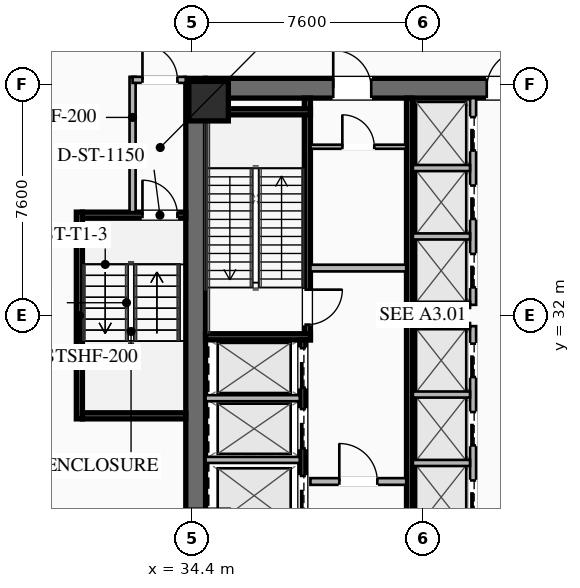
"""IFC4 building model, lengths in metres.
Left out: names, types, materials, properties, quantities, classifications, styles, units other than length and angle.
Written with IfcOpenShell. Run it as: python <this file> out.ifc"""

import sys

from ifc_helpers import new_model, si_unit, direction, frame, frame_2d, origin, origin_2d, place, context, subcontext, project, spatial, rectangle, hollow_rectangle, extrude, element, fill, save


model = new_model("IFC4")
c1 = context("Model", 3, precision=1e-05, world=origin(), true_north=direction((0.0, 1.0)))
c2 = subcontext(c1, "Body", "Model", "MODEL_VIEW")
j1 = project(units=[si_unit("LENGTHUNIT", "METRE"), si_unit("PLANEANGLEUNIT", "RADIAN")], contexts=[c1])
p1 = place(None, origin())
s1 = spatial("IfcSite", under=j1, at=p1, CompositionType="ELEMENT")
p2 = place(p1, origin())
s2 = spatial("IfcBuilding", under=s1, at=p2, CompositionType="ELEMENT")
p3 = place(p2, origin())
s3 = spatial("IfcBuildingStorey", under=s2, at=p3, CompositionType="ELEMENT", Elevation=0.0)
p4 = place(p3, frame((34.525, 24.2, 0.0), z_axis=(0.0, 0.0, 1.0), x_axis=(0.0, 1.0, 0.0)))
e1 = element("IfcWall", 1, at=p4, inside=s3, PredefinedType="SHEAR", context=c2, shape_type="SweptSolid", body=[
    extrude(rectangle(XDim=15.6, YDim=0.65, at=frame_2d((7.8, 0.0))), origin(), (0.0, 0.0, 1.0), 5.4),
])
p5 = place(p3, frame((34.85, 39.475, 0.0), z_axis=(0.0, 0.0, 1.0), x_axis=(1.0, 0.0, 0.0)))
e2 = element("IfcWall", 2, at=p5, inside=s3, PredefinedType="SHEAR", context=c2, shape_type="SweptSolid", body=[
    extrude(rectangle(XDim=14.3, YDim=0.65, at=frame_2d((7.15, 0.0))), origin(), (0.0, 0.0, 1.0), 5.4),
])
p6 = place(p5, frame((4.2, 0.0, 0.0)))
e3 = element("IfcOpeningElement", 3, at=p6, cuts=e2, PredefinedType="OPENING", context=c2, shape_type="SweptSolid", body=[
    extrude(rectangle(XDim=1.25, YDim=2.25, at=frame_2d((0.625, 1.125))), frame((0.0, 0.335, 0.0), z_axis=(0.0, -1.0, 0.0), x_axis=(1.0, 0.0, 0.0)), (0.0, 0.0, 1.0), 0.67),
])
p7 = place(p5, frame((9.25, 0.0, 0.0)))
e4 = element("IfcOpeningElement", 4, at=p7, cuts=e2, PredefinedType="OPENING", context=c2, shape_type="SweptSolid", body=[
    extrude(rectangle(XDim=1.25, YDim=2.25, at=frame_2d((0.625, 1.125))), frame((0.0, 0.335, 0.0), z_axis=(0.0, -1.0, 0.0), x_axis=(1.0, 0.0, 0.0)), (0.0, 0.0, 1.0), 0.67),
])
p8 = place(p3, frame((34.95, 39.05, 0.0), z_axis=(0.0, 0.0, 1.0), x_axis=(1.0, 0.0, 0.0)))
e5 = element("IfcColumn", 5, at=p8, inside=s3, PredefinedType="COLUMN", context=c2, shape_type="SweptSolid", body=[
    extrude(hollow_rectangle(XDim=1.3, YDim=1.3, WallThickness=0.05, at=origin_2d()), origin(), (0.0, 0.0, 1.0), 5.14),
])
p9 = place(p3, frame((38.2, 39.15, 0.0), z_axis=(0.0, 0.0, 1.0), x_axis=(0.0, -1.0, 0.0)))
e6 = element("IfcWall", 6, at=p9, inside=s3, PredefinedType="SHEAR", context=c2, shape_type="SweptSolid", body=[
    extrude(rectangle(XDim=7.95, YDim=0.2, at=frame_2d((3.975, 0.0))), origin(), (0.0, 0.0, 1.0), 5.14),
])
p10 = place(p9, frame((6.3, 0.0, 0.0)))
e7 = element("IfcOpeningElement", 7, at=p10, cuts=e6, PredefinedType="OPENING", context=c2, shape_type="SweptSolid", body=[
    extrude(rectangle(XDim=1.15, YDim=2.2, at=frame_2d((0.575, 1.1))), frame((0.0, 0.11, 0.0), z_axis=(0.0, -1.0, 0.0), x_axis=(1.0, 0.0, 0.0)), (0.0, 0.0, 1.0), 0.22),
])
for number, where, z_axis, x_axis in (
    (8, (34.85, 31.3, 0.0), (0.0, 0.0, 1.0), (1.0, 0.0, 0.0)),
    (9, (34.85, 38.7, 0.0), (0.0, 0.0, 1.0), (1.0, 0.0, 0.0)),
):
    element("IfcWall", number, at=place(p3, frame(where, z_axis=z_axis, x_axis=x_axis)), inside=s3, PredefinedType="SHEAR", context=c2, shape_type="SweptSolid", body=[
        extrude(rectangle(XDim=3.45, YDim=0.2, at=frame_2d((1.725, 0.0))), origin(), (0.0, 0.0, 1.0), 5.14),
    ])
p11 = place(p3, frame((41.56, 24.85, 0.0), z_axis=(0.0, 0.0, 1.0), x_axis=(0.0, 1.0, 0.0)))
e10 = element("IfcWall", 10, at=p11, inside=s3, PredefinedType="SHEAR", context=c2, shape_type="SweptSolid", body=[
    extrude(rectangle(XDim=14.3, YDim=0.2, at=frame_2d((7.15, 0.0))), origin(), (0.0, 0.0, 1.0), 5.14),
])
p12 = place(p3, frame((38.3, 33.56, 0.0), z_axis=(0.0, 0.0, 1.0), x_axis=(1.0, 0.0, 0.0)))
e11 = element("IfcWall", 11, at=p12, inside=s3, PredefinedType="SOLIDWALL", context=c2, shape_type="SweptSolid", body=[
    extrude(rectangle(XDim=3.15, YDim=0.22, at=frame_2d((1.575, 0.0))), origin(), (0.0, 0.0, 1.0), 3.31),
])
p13 = place(p3, frame((38.3, 26.54, 0.0), z_axis=(0.0, 0.0, 1.0), x_axis=(1.0, 0.0, 0.0)))
e12 = element("IfcWall", 12, at=p13, inside=s3, PredefinedType="SOLIDWALL", context=c2, shape_type="SweptSolid", body=[
    extrude(rectangle(XDim=3.15, YDim=0.22, at=frame_2d((1.575, 0.0))), origin(), (0.0, 0.0, 1.0), 3.31),
])
p14 = place(p13, frame((0.95, 0.0, 0.0)))
e13 = element("IfcOpeningElement", 13, at=p14, cuts=e12, PredefinedType="OPENING", context=c2, shape_type="SweptSolid", body=[
    extrude(rectangle(XDim=1.25, YDim=2.25, at=frame_2d((0.625, 1.125))), frame((0.0, 0.12, 0.0), z_axis=(0.0, -1.0, 0.0), x_axis=(1.0, 0.0, 0.0)), (0.0, 0.0, 1.0), 0.24),
])
p15 = place(p3, frame((38.05, 24.85, 0.0), z_axis=(0.0, 0.0, 1.0), x_axis=(0.0, 1.0, 0.0)))
e14 = element("IfcWall", 14, at=p15, inside=s3, PredefinedType="SHEAR", context=c2, shape_type="SweptSolid", body=[
    extrude(rectangle(XDim=6.35, YDim=0.2, at=frame_2d((3.175, 0.0))), origin(), (0.0, 0.0, 1.0), 5.14),
])
p16 = place(p15, frame((4.775, 0.0, 0.0)))
e15 = element("IfcOpeningElement", 15, at=p16, cuts=e14, PredefinedType="OPENING", context=c2, shape_type="SweptSolid", body=[
    extrude(rectangle(XDim=1.3, YDim=2.25, at=frame_2d((0.65, 1.125))), frame((0.0, 0.11, 0.0), z_axis=(0.0, -1.0, 0.0), x_axis=(1.0, 0.0, 0.0)), (0.0, 0.0, 1.0), 0.22),
])
p17 = place(p15, frame((2.775, 0.0, 0.0)))
e16 = element("IfcOpeningElement", 16, at=p17, cuts=e14, PredefinedType="OPENING", context=c2, shape_type="SweptSolid", body=[
    extrude(rectangle(XDim=1.3, YDim=2.25, at=frame_2d((0.65, 1.125))), frame((0.0, 0.11, 0.0), z_axis=(0.0, -1.0, 0.0), x_axis=(1.0, 0.0, 0.0)), (0.0, 0.0, 1.0), 0.22),
])
p18 = place(p15, frame((0.575, 0.0, 0.0)))
e17 = element("IfcOpeningElement", 17, at=p18, cuts=e14, PredefinedType="OPENING", context=c2, shape_type="SweptSolid", body=[
    extrude(rectangle(XDim=1.3, YDim=2.25, at=frame_2d((0.65, 1.125))), frame((0.0, 0.11, 0.0), z_axis=(0.0, -1.0, 0.0), x_axis=(1.0, 0.0, 0.0)), (0.0, 0.0, 1.0), 0.22),
])
for number, where, z_axis, x_axis in (
    (18, (34.85, 27.25, 0.0), (0.0, 0.0, 1.0), (1.0, 0.0, 0.0)),
    (19, (34.85, 29.28, 0.0), (0.0, 0.0, 1.0), (1.0, 0.0, 0.0)),
):
    element("IfcWall", number, at=place(p3, frame(where, z_axis=z_axis, x_axis=x_axis)), inside=s3, PredefinedType="SOLIDWALL", context=c2, shape_type="SweptSolid", body=[
        extrude(rectangle(XDim=3.1, YDim=0.2, at=frame_2d((1.55, 0.0))), origin(), (0.0, 0.0, 1.0), 5.14),
    ])
p19 = place(p3, frame((38.3, 37.55, 0.0), z_axis=(0.0, 0.0, 1.0), x_axis=(1.0, 0.0, 0.0)))
e20 = element("IfcWall", 20, at=p19, inside=s3, PredefinedType="PARTITIONING", context=c2, shape_type="SweptSolid", body=[
    extrude(rectangle(XDim=3.15, YDim=0.135, at=frame_2d((1.575, 0.0))), origin(), (0.0, 0.0, 1.0), 3.31),
])
p20 = place(p19, frame((1.05, 0.0, 0.0)))
e21 = element("IfcOpeningElement", 21, at=p20, cuts=e20, PredefinedType="OPENING", context=c2, shape_type="SweptSolid", body=[
    extrude(rectangle(XDim=1.05, YDim=2.2, at=frame_2d((0.525, 1.1))), frame((0.0, 0.077, 0.0), z_axis=(0.0, -1.0, 0.0), x_axis=(1.0, 0.0, 0.0)), (0.0, 0.0, 1.0), 0.155),
])
p21 = place(p3, frame((43.65, 24.85, 0.0), z_axis=(0.0, 0.0, 1.0), x_axis=(0.0, 1.0, 0.0)))
e22 = element("IfcWall", 22, at=p21, inside=s3, PredefinedType="SOLIDWALL", context=c2, shape_type="SweptSolid", body=[
    extrude(rectangle(XDim=6.8, YDim=0.2, at=frame_2d((3.4, 0.0))), origin(), (0.0, 0.0, 1.0), 5.14),
])
p22 = place(p21, frame((0.625, 0.0, 0.0)))
e23 = element("IfcOpeningElement", 23, at=p22, cuts=e22, PredefinedType="OPENING", context=c2, shape_type="SweptSolid", body=[
    extrude(rectangle(XDim=1.1, YDim=2.2, at=frame_2d((0.55, 1.1))), frame((0.0, 0.11, 0.0), z_axis=(0.0, -1.0, 0.0), x_axis=(1.0, 0.0, 0.0)), (0.0, 0.0, 1.0), 0.22),
])
p23 = place(p21, frame((2.875, 0.0, 0.0)))
e24 = element("IfcOpeningElement", 24, at=p23, cuts=e22, PredefinedType="OPENING", context=c2, shape_type="SweptSolid", body=[
    extrude(rectangle(XDim=1.1, YDim=2.2, at=frame_2d((0.55, 1.1))), frame((0.0, 0.11, 0.0), z_axis=(0.0, -1.0, 0.0), x_axis=(1.0, 0.0, 0.0)), (0.0, 0.0, 1.0), 0.22),
])
p24 = place(p21, frame((5.125, 0.0, 0.0)))
e25 = element("IfcOpeningElement", 25, at=p24, cuts=e22, PredefinedType="OPENING", context=c2, shape_type="SweptSolid", body=[
    extrude(rectangle(XDim=1.1, YDim=2.2, at=frame_2d((0.55, 1.1))), frame((0.0, 0.11, 0.0), z_axis=(0.0, -1.0, 0.0), x_axis=(1.0, 0.0, 0.0)), (0.0, 0.0, 1.0), 0.22),
])
for number, where, z_axis, x_axis in (
    (26, (41.67, 27.15, 0.0), (0.0, 0.0, 1.0), (1.0, 0.0, 0.0)),
    (27, (41.67, 29.4, 0.0), (0.0, 0.0, 1.0), (1.0, 0.0, 0.0)),
    (28, (41.67, 31.65, 0.0), (0.0, 0.0, 1.0), (1.0, 0.0, 0.0)),
):
    element("IfcWall", number, at=place(p3, frame(where, z_axis=z_axis, x_axis=x_axis)), inside=s3, PredefinedType="SOLIDWALL", context=c2, shape_type="SweptSolid", body=[
        extrude(rectangle(XDim=1.88, YDim=0.2, at=frame_2d((0.94, 0.0))), origin(), (0.0, 0.0, 1.0), 5.14),
    ])
p25 = place(p3, frame((43.65, 32.35, 0.0), z_axis=(0.0, 0.0, 1.0), x_axis=(0.0, 1.0, 0.0)))
e29 = element("IfcWall", 29, at=p25, inside=s3, PredefinedType="SOLIDWALL", context=c2, shape_type="SweptSolid", body=[
    extrude(rectangle(XDim=6.8, YDim=0.2, at=frame_2d((3.4, 0.0))), origin(), (0.0, 0.0, 1.0), 5.14),
])
p26 = place(p25, frame((0.575, 0.0, 0.0)))
e30 = element("IfcOpeningElement", 30, at=p26, cuts=e29, PredefinedType="OPENING", context=c2, shape_type="SweptSolid", body=[
    extrude(rectangle(XDim=1.1, YDim=2.2, at=frame_2d((0.55, 1.1))), frame((0.0, 0.11, 0.0), z_axis=(0.0, -1.0, 0.0), x_axis=(1.0, 0.0, 0.0)), (0.0, 0.0, 1.0), 0.22),
])
p27 = place(p25, frame((2.825, 0.0, 0.0)))
e31 = element("IfcOpeningElement", 31, at=p27, cuts=e29, PredefinedType="OPENING", context=c2, shape_type="SweptSolid", body=[
    extrude(rectangle(XDim=1.1, YDim=2.2, at=frame_2d((0.55, 1.1))), frame((0.0, 0.11, 0.0), z_axis=(0.0, -1.0, 0.0), x_axis=(1.0, 0.0, 0.0)), (0.0, 0.0, 1.0), 0.22),
])
p28 = place(p25, frame((5.075, 0.0, 0.0)))
e32 = element("IfcOpeningElement", 32, at=p28, cuts=e29, PredefinedType="OPENING", context=c2, shape_type="SweptSolid", body=[
    extrude(rectangle(XDim=1.1, YDim=2.2, at=frame_2d((0.55, 1.1))), frame((0.0, 0.11, 0.0), z_axis=(0.0, -1.0, 0.0), x_axis=(1.0, 0.0, 0.0)), (0.0, 0.0, 1.0), 0.22),
])
for number, where, z_axis, x_axis in (
    (33, (41.67, 32.35, 0.0), (0.0, 0.0, 1.0), (1.0, 0.0, 0.0)),
    (34, (41.67, 34.6, 0.0), (0.0, 0.0, 1.0), (1.0, 0.0, 0.0)),
    (35, (41.67, 36.85, 0.0), (0.0, 0.0, 1.0), (1.0, 0.0, 0.0)),
):
    element("IfcWall", number, at=place(p3, frame(where, z_axis=z_axis, x_axis=x_axis)), inside=s3, PredefinedType="SOLIDWALL", context=c2, shape_type="SweptSolid", body=[
        extrude(rectangle(XDim=1.88, YDim=0.2, at=frame_2d((0.94, 0.0))), origin(), (0.0, 0.0, 1.0), 5.14),
    ])
p29 = place(p3, frame((30.7, 28.6, 0.0), z_axis=(0.0, 0.0, 1.0), x_axis=(0.0, 1.0, 0.0)))
e36 = element("IfcWall", 36, at=p29, inside=s3, PredefinedType="SHEAR", context=c2, shape_type="SweptSolid", body=[
    extrude(rectangle(XDim=6.8, YDim=0.2, at=frame_2d((3.4, 0.0))), origin(), (0.0, 0.0, 1.0), 5.14),
])
p30 = place(p3, frame((30.8, 35.3, 0.0), z_axis=(0.0, 0.0, 1.0), x_axis=(1.0, 0.0, 0.0)))
e37 = element("IfcWall", 37, at=p30, inside=s3, PredefinedType="SHEAR", context=c2, shape_type="SweptSolid", body=[
    extrude(rectangle(XDim=3.4, YDim=0.2, at=frame_2d((1.7, 0.0))), origin(), (0.0, 0.0, 1.0), 5.14),
])
p31 = place(p30, frame((1.975, 0.0, 0.0)))
e38 = element("IfcOpeningElement", 38, at=p31, cuts=e37, PredefinedType="OPENING", context=c2, shape_type="SweptSolid", body=[
    extrude(rectangle(XDim=1.15, YDim=2.2, at=frame_2d((0.575, 1.1))), frame((0.0, 0.11, 0.0), z_axis=(0.0, -1.0, 0.0), x_axis=(1.0, 0.0, 0.0)), (0.0, 0.0, 1.0), 0.22),
])
p32 = place(p3, frame((30.8, 28.7, 0.0), z_axis=(0.0, 0.0, 1.0), x_axis=(1.0, 0.0, 0.0)))
e39 = element("IfcWall", 39, at=p32, inside=s3, PredefinedType="SHEAR", context=c2, shape_type="SweptSolid", body=[
    extrude(rectangle(XDim=3.4, YDim=0.2, at=frame_2d((1.7, 0.0))), origin(), (0.0, 0.0, 1.0), 5.14),
])
p33 = place(p3, frame((32.45, 35.4, 0.0), z_axis=(0.0, 0.0, 1.0), x_axis=(0.0, 1.0, 0.0)))
e40 = element("IfcWall", 40, at=p33, inside=s3, PredefinedType="SOLIDWALL", context=c2, shape_type="SweptSolid", body=[
    extrude(rectangle(XDim=4.45, YDim=0.2, at=frame_2d((2.225, 0.0))), origin(), (0.0, 0.0, 1.0), 3.31),
])
p34 = place(p3, frame((32.45, 39.75, 0.0), z_axis=(0.0, 0.0, 1.0), x_axis=(1.0, 0.0, 0.0)))
e41 = element("IfcWall", 41, at=p34, inside=s3, PredefinedType="SOLIDWALL", context=c2, shape_type="SweptSolid", body=[
    extrude(rectangle(XDim=1.75, YDim=0.2, at=frame_2d((0.875, 0.0))), origin(), (0.0, 0.0, 1.0), 3.31),
])
p35 = place(p34, frame((0.325, 0.0, 0.0)))
e42 = element("IfcOpeningElement", 42, at=p35, cuts=e41, PredefinedType="OPENING", context=c2, shape_type="SweptSolid", body=[
    extrude(rectangle(XDim=1.15, YDim=2.2, at=frame_2d((0.575, 1.1))), frame((0.0, 0.11, 0.0), z_axis=(0.0, -1.0, 0.0), x_axis=(1.0, 0.0, 0.0)), (0.0, 0.0, 1.0), 0.22),
])
p36 = place(p6, origin())
e43 = element("IfcDoor", 43, at=p36, inside=s3, OperationType="SINGLE_SWING_LEFT", PredefinedType="DOOR", context=c2, shape_type="SweptSolid", body=[
    extrude(rectangle(XDim=1.25, YDim=2.25, at=frame_2d((0.625, 1.125))), frame((0.0, 0.025, 0.0), z_axis=(0.0, -1.0, 0.0), x_axis=(1.0, 0.0, 0.0)), (0.0, 0.0, 1.0), 0.05),
])
fill(e3, e43)
p37 = place(p7, origin())
e44 = element("IfcDoor", 44, at=p37, inside=s3, OperationType="SINGLE_SWING_RIGHT", PredefinedType="DOOR", context=c2, shape_type="SweptSolid", body=[
    extrude(rectangle(XDim=1.25, YDim=2.25, at=frame_2d((0.625, 1.125))), frame((0.0, 0.025, 0.0), z_axis=(0.0, -1.0, 0.0), x_axis=(1.0, 0.0, 0.0)), (0.0, 0.0, 1.0), 0.05),
])
fill(e4, e44)
p38 = place(p10, origin())
e45 = element("IfcDoor", 45, at=p38, inside=s3, OperationType="SINGLE_SWING_LEFT", PredefinedType="DOOR", context=c2, shape_type="SweptSolid", body=[
    extrude(rectangle(XDim=1.15, YDim=2.2, at=frame_2d((0.575, 1.1))), frame((0.0, 0.025, 0.0), z_axis=(0.0, -1.0, 0.0), x_axis=(1.0, 0.0, 0.0)), (0.0, 0.0, 1.0), 0.05),
])
fill(e7, e45)
p39 = place(p14, origin())
e46 = element("IfcDoor", 46, at=p39, inside=s3, OperationType="SINGLE_SWING_LEFT", PredefinedType="DOOR", context=c2, shape_type="SweptSolid", body=[
    extrude(rectangle(XDim=1.25, YDim=2.25, at=frame_2d((0.625, 1.125))), frame((0.0, 0.025, 0.0), z_axis=(0.0, -1.0, 0.0), x_axis=(1.0, 0.0, 0.0)), (0.0, 0.0, 1.0), 0.05),
])
fill(e13, e46)
p40 = place(p20, origin())
e47 = element("IfcDoor", 47, at=p40, inside=s3, OperationType="SINGLE_SWING_LEFT", PredefinedType="DOOR", context=c2, shape_type="SweptSolid", body=[
    extrude(rectangle(XDim=1.05, YDim=2.2, at=frame_2d((0.525, 1.1))), frame((0.0, 0.025, 0.0), z_axis=(0.0, -1.0, 0.0), x_axis=(1.0, 0.0, 0.0)), (0.0, 0.0, 1.0), 0.05),
])
fill(e21, e47)
p41 = place(p31, origin())
e48 = element("IfcDoor", 48, at=p41, inside=s3, OperationType="SINGLE_SWING_LEFT", PredefinedType="DOOR", context=c2, shape_type="SweptSolid", body=[
    extrude(rectangle(XDim=1.15, YDim=2.2, at=frame_2d((0.575, 1.1))), frame((0.0, 0.025, 0.0), z_axis=(0.0, -1.0, 0.0), x_axis=(1.0, 0.0, 0.0)), (0.0, 0.0, 1.0), 0.05),
])
fill(e38, e48)
p42 = place(p35, origin())
e49 = element("IfcDoor", 49, at=p42, inside=s3, OperationType="SINGLE_SWING_LEFT", PredefinedType="DOOR", context=c2, shape_type="SweptSolid", body=[
    extrude(rectangle(XDim=1.15, YDim=2.2, at=frame_2d((0.575, 1.1))), frame((0.0, 0.025, 0.0), z_axis=(0.0, -1.0, 0.0), x_axis=(1.0, 0.0, 0.0)), (0.0, 0.0, 1.0), 0.05),
])
fill(e42, e49)
p43 = place(p16, origin())
e50 = element("IfcDoor", 50, at=p43, inside=s3, OperationType="SLIDING_TO_LEFT", PredefinedType="DOOR", context=c2, shape_type="SweptSolid", body=[
    extrude(rectangle(XDim=1.3, YDim=2.25, at=frame_2d((0.65, 1.125))), frame((0.0, 0.025, 0.0), z_axis=(0.0, -1.0, 0.0), x_axis=(1.0, 0.0, 0.0)), (0.0, 0.0, 1.0), 0.05),
])
fill(e15, e50)
p44 = place(p17, origin())
e51 = element("IfcDoor", 51, at=p44, inside=s3, OperationType="SLIDING_TO_LEFT", PredefinedType="DOOR", context=c2, shape_type="SweptSolid", body=[
    extrude(rectangle(XDim=1.3, YDim=2.25, at=frame_2d((0.65, 1.125))), frame((0.0, 0.025, 0.0), z_axis=(0.0, -1.0, 0.0), x_axis=(1.0, 0.0, 0.0)), (0.0, 0.0, 1.0), 0.05),
])
fill(e16, e51)
p45 = place(p18, origin())
e52 = element("IfcDoor", 52, at=p45, inside=s3, OperationType="SLIDING_TO_LEFT", PredefinedType="DOOR", context=c2, shape_type="SweptSolid", body=[
    extrude(rectangle(XDim=1.3, YDim=2.25, at=frame_2d((0.65, 1.125))), frame((0.0, 0.025, 0.0), z_axis=(0.0, -1.0, 0.0), x_axis=(1.0, 0.0, 0.0)), (0.0, 0.0, 1.0), 0.05),
])
fill(e17, e52)
p46 = place(p22, origin())
e53 = element("IfcDoor", 53, at=p46, inside=s3, OperationType="SLIDING_TO_LEFT", PredefinedType="DOOR", context=c2, shape_type="SweptSolid", body=[
    extrude(rectangle(XDim=1.1, YDim=2.2, at=frame_2d((0.55, 1.1))), frame((0.0, 0.025, 0.0), z_axis=(0.0, -1.0, 0.0), x_axis=(1.0, 0.0, 0.0)), (0.0, 0.0, 1.0), 0.05),
])
fill(e23, e53)
p47 = place(p23, origin())
e54 = element("IfcDoor", 54, at=p47, inside=s3, OperationType="SLIDING_TO_LEFT", PredefinedType="DOOR", context=c2, shape_type="SweptSolid", body=[
    extrude(rectangle(XDim=1.1, YDim=2.2, at=frame_2d((0.55, 1.1))), frame((0.0, 0.025, 0.0), z_axis=(0.0, -1.0, 0.0), x_axis=(1.0, 0.0, 0.0)), (0.0, 0.0, 1.0), 0.05),
])
fill(e24, e54)
p48 = place(p24, origin())
e55 = element("IfcDoor", 55, at=p48, inside=s3, OperationType="SLIDING_TO_LEFT", PredefinedType="DOOR", context=c2, shape_type="SweptSolid", body=[
    extrude(rectangle(XDim=1.1, YDim=2.2, at=frame_2d((0.55, 1.1))), frame((0.0, 0.025, 0.0), z_axis=(0.0, -1.0, 0.0), x_axis=(1.0, 0.0, 0.0)), (0.0, 0.0, 1.0), 0.05),
])
fill(e25, e55)
p49 = place(p26, origin())
e56 = element("IfcDoor", 56, at=p49, inside=s3, OperationType="SLIDING_TO_LEFT", PredefinedType="DOOR", context=c2, shape_type="SweptSolid", body=[
    extrude(rectangle(XDim=1.1, YDim=2.2, at=frame_2d((0.55, 1.1))), frame((0.0, 0.025, 0.0), z_axis=(0.0, -1.0, 0.0), x_axis=(1.0, 0.0, 0.0)), (0.0, 0.0, 1.0), 0.05),
])
fill(e30, e56)
p50 = place(p27, origin())
e57 = element("IfcDoor", 57, at=p50, inside=s3, OperationType="SLIDING_TO_LEFT", PredefinedType="DOOR", context=c2, shape_type="SweptSolid", body=[
    extrude(rectangle(XDim=1.1, YDim=2.2, at=frame_2d((0.55, 1.1))), frame((0.0, 0.025, 0.0), z_axis=(0.0, -1.0, 0.0), x_axis=(1.0, 0.0, 0.0)), (0.0, 0.0, 1.0), 0.05),
])
fill(e31, e57)
p51 = place(p28, origin())
e58 = element("IfcDoor", 58, at=p51, inside=s3, OperationType="SLIDING_TO_LEFT", PredefinedType="DOOR", context=c2, shape_type="SweptSolid", body=[
    extrude(rectangle(XDim=1.1, YDim=2.2, at=frame_2d((0.55, 1.1))), frame((0.0, 0.025, 0.0), z_axis=(0.0, -1.0, 0.0), x_axis=(1.0, 0.0, 0.0)), (0.0, 0.0, 1.0), 0.05),
])
fill(e32, e58)
save(model, sys.argv[1])
